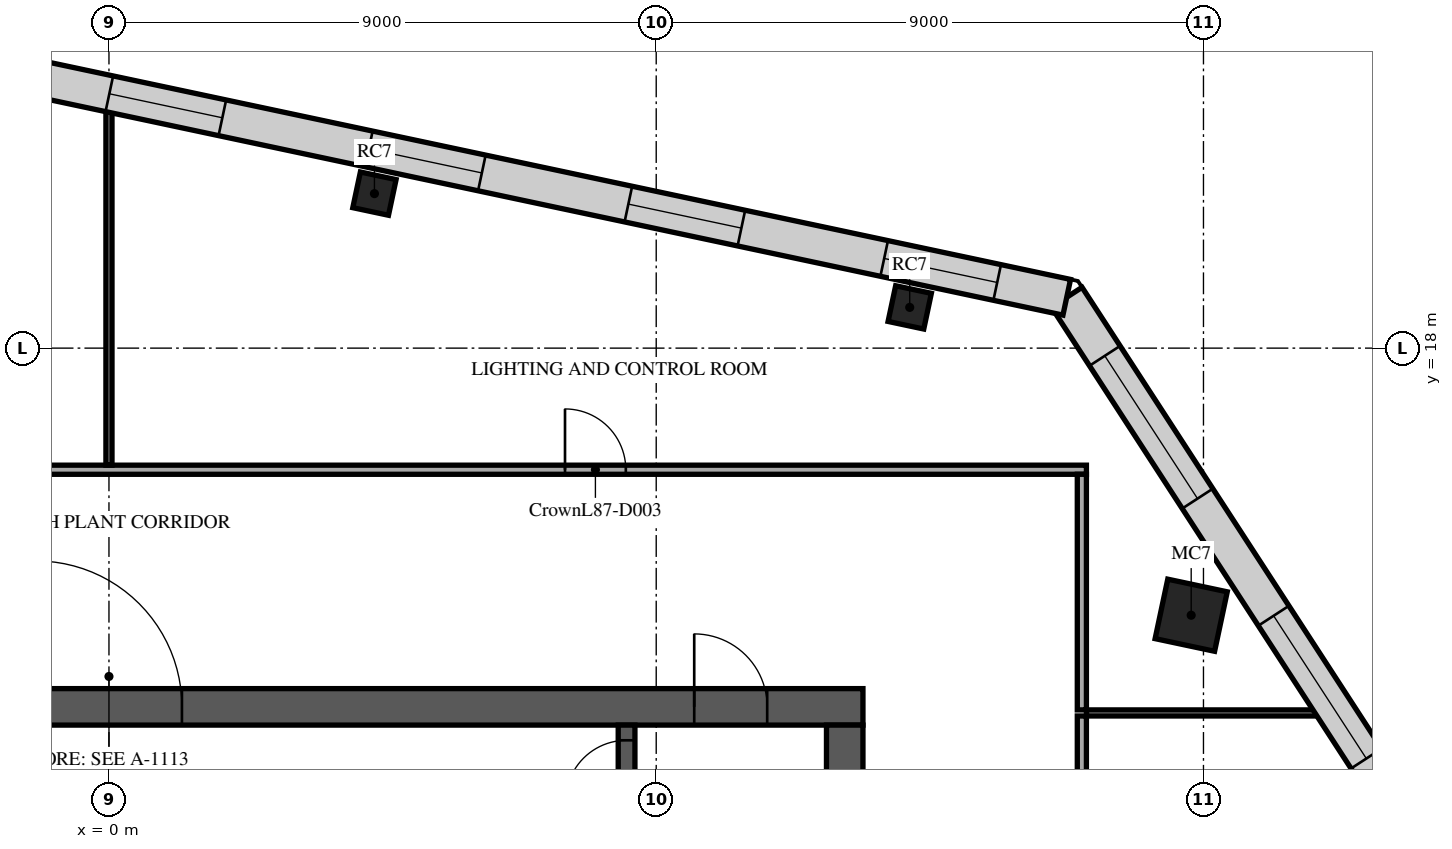
"""IFC4 building model, lengths in metres.
Left out: names, types, materials, properties, quantities, classifications, styles, units other than length and angle.
Written with IfcOpenShell. Run it as: python <this file> out.ifc"""

import sys

from ifc_helpers import new_model, si_unit, direction, frame, frame_2d, origin, origin_2d, place, context, subcontext, project, spatial, rectangle, extrude, element, fill, save


model = new_model("IFC4")
c1 = context("Model", 3, precision=1e-05, world=origin(), true_north=direction((0.0, 1.0)))
c2 = subcontext(c1, "Body", "Model", "MODEL_VIEW")
j1 = project(units=[si_unit("LENGTHUNIT", "METRE"), si_unit("PLANEANGLEUNIT", "RADIAN")], contexts=[c1])
p1 = place(None, origin())
s1 = spatial("IfcSite", under=j1, at=p1, CompositionType="ELEMENT")
p2 = place(p1, origin())
s2 = spatial("IfcBuilding", under=s1, at=p2, CompositionType="ELEMENT")
p3 = place(p2, frame((0.0, 0.0, 373.1)))
s3 = spatial("IfcBuildingStorey", under=s2, at=p3, CompositionType="ELEMENT", Elevation=373.1)
p4 = place(p3, frame((17.798, 13.607, 0.0), z_axis=(0.0, 0.0, 1.0), x_axis=(0.207911690818, 0.978147600734, 0.0)))
e1 = element("IfcColumn", 1, at=p4, inside=s3, PredefinedType="COLUMN", context=c2, shape_type="SweptSolid", body=[
    extrude(rectangle(XDim=1.0, YDim=1.0, at=origin_2d()), origin(), (0.0, 0.0, 1.0), 3.5),
])
for number, where, z_axis, x_axis in (
    (2, (13.169, 18.67, 0.0), (0.0, 0.0, 1.0), (0.208, 0.978, 0.0)),
    (3, (4.366, 20.541, 0.0), (0.0, 0.0, 1.0), (0.208, 0.978, 0.0)),
):
    element("IfcColumn", number, at=place(p3, frame(where, z_axis=z_axis, x_axis=x_axis)), inside=s3, PredefinedType="COLUMN", context=c2, shape_type="SweptSolid", body=[
        extrude(rectangle(XDim=0.6, YDim=0.6, at=origin_2d()), origin(), (0.0, 0.0, 1.0), 3.5),
    ])
p5 = place(p3, frame((-12.4, 12.1, 0.0), z_axis=(0.0, 0.0, 1.0), x_axis=(1.0, 0.0, 0.0)))
e4 = element("IfcWall", 4, at=p5, inside=s3, PredefinedType="SHEAR", context=c2, shape_type="SweptSolid", body=[
    extrude(rectangle(XDim=24.8, YDim=0.6, at=frame_2d((12.4, 0.0))), origin(), (0.0, 0.0, 1.0), 3.2),
])
p6 = place(p5, frame((11.2, 0.0, 0.0)))
e5 = element("IfcOpeningElement", 5, at=p6, cuts=e4, PredefinedType="OPENING", context=c2, shape_type="SweptSolid", body=[
    extrude(rectangle(XDim=2.4, YDim=2.4, at=frame_2d((1.2, 1.2))), frame((0.0, 0.31, 0.0), z_axis=(0.0, -1.0, 0.0), x_axis=(1.0, 0.0, 0.0)), (0.0, 0.0, 1.0), 0.62),
])
p7 = place(p5, frame((22.025, 0.0, 0.0)))
e6 = element("IfcOpeningElement", 6, at=p7, cuts=e4, PredefinedType="OPENING", context=c2, shape_type="SweptSolid", body=[
    extrude(rectangle(XDim=1.2, YDim=2.1, at=frame_2d((0.6, 1.05))), frame((0.0, 0.31, 0.0), z_axis=(0.0, -1.0, 0.0), x_axis=(1.0, 0.0, 0.0)), (0.0, 0.0, 1.0), 0.62),
])
p8 = place(p5, frame((1.0, 0.0, 0.0)))
e7 = element("IfcOpeningElement", 7, at=p8, cuts=e4, PredefinedType="OPENING", context=c2, shape_type="SweptSolid", body=[
    extrude(rectangle(XDim=1.0, YDim=2.1, at=frame_2d((0.5, 1.05))), frame((0.0, 0.31, 0.0), z_axis=(0.0, -1.0, 0.0), x_axis=(1.0, 0.0, 0.0)), (0.0, 0.0, 1.0), 0.62),
])
p9 = place(p3, frame((12.1, -11.8, 0.0), z_axis=(0.0, 0.0, 1.0), x_axis=(0.0, 1.0, 0.0)))
e8 = element("IfcWall", 8, at=p9, inside=s3, PredefinedType="SHEAR", context=c2, shape_type="SweptSolid", body=[
    extrude(rectangle(XDim=23.6, YDim=0.6, at=frame_2d((11.8, 0.0))), origin(), (0.0, 0.0, 1.0), 3.2),
])
p10 = place(p9, frame((10.6, 0.0, 0.0)))
e9 = element("IfcOpeningElement", 9, at=p10, cuts=e8, PredefinedType="OPENING", context=c2, shape_type="SweptSolid", body=[
    extrude(rectangle(XDim=2.4, YDim=2.4, at=frame_2d((1.2, 1.2))), frame((0.0, 0.31, 0.0), z_axis=(0.0, -1.0, 0.0), x_axis=(1.0, 0.0, 0.0)), (0.0, 0.0, 1.0), 0.62),
])
p11 = place(p3, frame((8.512, 4.55, 0.0), z_axis=(0.0, 0.0, 1.0), x_axis=(0.0, 1.0, 0.0)))
e10 = element("IfcWall", 10, at=p11, inside=s3, PredefinedType="SOLIDWALL", context=c2, shape_type="SweptSolid", body=[
    extrude(rectangle(XDim=7.25, YDim=0.275, at=frame_2d((3.625, 0.0))), origin(), (0.0, 0.0, 1.0), 3.2),
])
p12 = place(p11, frame((6.0, 0.0, 0.0)))
e11 = element("IfcOpeningElement", 11, at=p12, cuts=e10, PredefinedType="OPENING", context=c2, shape_type="SweptSolid", body=[
    extrude(rectangle(XDim=1.0, YDim=2.1, at=frame_2d((0.5, 1.05))), frame((0.0, 0.147, 0.0), z_axis=(0.0, -1.0, 0.0), x_axis=(1.0, 0.0, 0.0)), (0.0, 0.0, 1.0), 0.295),
])
p13 = place(p3, frame((16.075, 12.0, 0.0), z_axis=(0.0, 0.0, 1.0), x_axis=(1.0, 0.0, 0.0)))
e12 = element("IfcWall", 12, at=p13, inside=s3, PredefinedType="PARTITIONING", context=c2, shape_type="SweptSolid", body=[
    extrude(rectangle(XDim=3.997, YDim=0.1, at=frame_2d((1.999, 0.0))), origin(), (0.0, 0.0, 1.0), 3.2),
])
p14 = place(p3, frame((-15.615, 16.0, 0.0), z_axis=(0.0, 0.0, 1.0), x_axis=(1.0, 0.0, 0.0)))
e13 = element("IfcWall", 13, at=p14, inside=s3, PredefinedType="PARTITIONING", context=c2, shape_type="SweptSolid", body=[
    extrude(rectangle(XDim=31.689, YDim=0.15, at=frame_2d((15.845, 0.0))), origin(), (0.0, 0.0, 1.0), 2.63),
])
p15 = place(p14, frame((0.315, 0.0, 0.0)))
e14 = element("IfcOpeningElement", 14, at=p15, cuts=e13, PredefinedType="OPENING", context=c2, shape_type="SweptSolid", body=[
    extrude(rectangle(XDim=1.0, YDim=2.1, at=frame_2d((0.5, 1.05))), frame((0.0, 0.085, 0.0), z_axis=(0.0, -1.0, 0.0), x_axis=(1.0, 0.0, 0.0)), (0.0, 0.0, 1.0), 0.17),
])
p16 = place(p14, frame((23.115, 0.0, 0.0)))
e15 = element("IfcOpeningElement", 15, at=p16, cuts=e13, PredefinedType="OPENING", context=c2, shape_type="SweptSolid", body=[
    extrude(rectangle(XDim=1.0, YDim=2.1, at=frame_2d((0.5, 1.05))), frame((0.0, 0.085, 0.0), z_axis=(0.0, -1.0, 0.0), x_axis=(1.0, 0.0, 0.0)), (0.0, 0.0, 1.0), 0.17),
])
p17 = place(p3, frame((0.0, 16.075, 0.0), z_axis=(0.0, 0.0, 1.0), x_axis=(0.0, 1.0, 0.0)))
e16 = element("IfcWall", 16, at=p17, inside=s3, PredefinedType="PARTITIONING", context=c2, shape_type="SweptSolid", body=[
    extrude(rectangle(XDim=6.008, YDim=0.1, at=frame_2d((3.004, 0.0))), origin(), (0.0, 0.0, 1.0), 3.2),
])
p18 = place(p3, frame((16.0, -11.925, 0.0), z_axis=(0.0, 0.0, 1.0), x_axis=(0.0, 1.0, 0.0)))
e17 = element("IfcWall", 17, at=p18, inside=s3, PredefinedType="PARTITIONING", context=c2, shape_type="SweptSolid", body=[
    extrude(rectangle(XDim=23.875, YDim=0.15, at=frame_2d((11.938, 0.0))), origin(), (0.0, 0.0, 1.0), 2.63),
])
p19 = place(p18, frame((11.425, 0.0, 0.0)))
e18 = element("IfcOpeningElement", 18, at=p19, cuts=e17, PredefinedType="OPENING", context=c2, shape_type="SweptSolid", body=[
    extrude(rectangle(XDim=1.0, YDim=2.1, at=frame_2d((0.5, 1.05))), frame((0.0, 0.085, 0.0), z_axis=(0.0, -1.0, 0.0), x_axis=(1.0, 0.0, 0.0)), (0.0, 0.0, 1.0), 0.17),
])
p20 = place(p3, frame((16.0, 12.05, 0.0), z_axis=(0.0, 0.0, 1.0), x_axis=(0.0, 1.0, 0.0)))
e19 = element("IfcWall", 19, at=p20, inside=s3, PredefinedType="PARTITIONING", context=c2, shape_type="SweptSolid", body=[
    extrude(rectangle(XDim=3.875, YDim=0.15, at=frame_2d((1.938, 0.0))), origin(), (0.0, 0.0, 1.0), 2.63),
])
p21 = place(p3, frame((21.304, 10.286, 0.0), z_axis=(0.0, 0.0, 1.0), x_axis=(-0.544646568575, 0.838665675546, 0.0)))
e20 = element("IfcWall", 20, at=p21, inside=s3, PredefinedType="STANDARD", context=c2, shape_type="SweptSolid", body=[
    extrude(rectangle(XDim=10.195, YDim=0.6, at=frame_2d((5.098, 0.0))), origin(), (0.0, 0.0, 1.0), 3.2),
])
p22 = place(p21, frame((1.149, 0.0, 0.6)))
e21 = element("IfcOpeningElement", 21, at=p22, cuts=e20, PredefinedType="OPENING", context=c2, shape_type="SweptSolid", body=[
    extrude(rectangle(XDim=2.8, YDim=1.85, at=frame_2d((1.4, 0.925))), frame((0.0, 0.31, 0.0), z_axis=(0.0, -1.0, 0.0), x_axis=(1.0, 0.0, 0.0)), (0.0, 0.0, 1.0), 0.62),
])
p23 = place(p21, frame((6.246, 0.0, 0.6)))
e22 = element("IfcOpeningElement", 22, at=p23, cuts=e20, PredefinedType="OPENING", context=c2, shape_type="SweptSolid", body=[
    extrude(rectangle(XDim=2.8, YDim=1.85, at=frame_2d((1.4, 0.925))), frame((0.0, 0.31, 0.0), z_axis=(0.0, -1.0, 0.0), x_axis=(1.0, 0.0, 0.0)), (0.0, 0.0, 1.0), 0.62),
])
p24 = place(p3, frame((15.751, 18.837, 0.0), z_axis=(0.0, 0.0, 1.0), x_axis=(-0.978148118813, 0.207909253431, 0.0)))
e23 = element("IfcWall", 23, at=p24, inside=s3, PredefinedType="STANDARD", context=c2, shape_type="SweptSolid", body=[
    extrude(rectangle(XDim=21.568, YDim=0.6, at=frame_2d((10.784, 0.0))), origin(), (0.0, 0.0, 1.0), 3.2),
])
p25 = place(p24, frame((1.169, 0.0, 0.6)))
e24 = element("IfcOpeningElement", 24, at=p25, cuts=e23, PredefinedType="OPENING", context=c2, shape_type="SweptSolid", body=[
    extrude(rectangle(XDim=1.9, YDim=1.85, at=frame_2d((0.95, 0.925))), frame((0.0, 0.31, 0.0), z_axis=(0.0, -1.0, 0.0), x_axis=(1.0, 0.0, 0.0)), (0.0, 0.0, 1.0), 0.62),
])
p26 = place(p24, frame((5.471, 0.0, 0.6)))
e25 = element("IfcOpeningElement", 25, at=p26, cuts=e23, PredefinedType="OPENING", context=c2, shape_type="SweptSolid", body=[
    extrude(rectangle(XDim=1.9, YDim=1.85, at=frame_2d((0.95, 0.925))), frame((0.0, 0.31, 0.0), z_axis=(0.0, -1.0, 0.0), x_axis=(1.0, 0.0, 0.0)), (0.0, 0.0, 1.0), 0.62),
])
p27 = place(p24, frame((9.834, 0.0, 0.6)))
e26 = element("IfcOpeningElement", 26, at=p27, cuts=e23, PredefinedType="OPENING", context=c2, shape_type="SweptSolid", body=[
    extrude(rectangle(XDim=1.9, YDim=1.85, at=frame_2d((0.95, 0.925))), frame((0.0, 0.31, 0.0), z_axis=(0.0, -1.0, 0.0), x_axis=(1.0, 0.0, 0.0)), (0.0, 0.0, 1.0), 0.62),
])
p28 = place(p24, frame((14.197, 0.0, 0.6)))
e27 = element("IfcOpeningElement", 27, at=p28, cuts=e23, PredefinedType="OPENING", context=c2, shape_type="SweptSolid", body=[
    extrude(rectangle(XDim=1.9, YDim=1.85, at=frame_2d((0.95, 0.925))), frame((0.0, 0.31, 0.0), z_axis=(0.0, -1.0, 0.0), x_axis=(1.0, 0.0, 0.0)), (0.0, 0.0, 1.0), 0.62),
])
p29 = place(p24, frame((18.498, 0.0, 0.6)))
e28 = element("IfcOpeningElement", 28, at=p29, cuts=e23, PredefinedType="OPENING", context=c2, shape_type="SweptSolid", body=[
    extrude(rectangle(XDim=1.9, YDim=1.85, at=frame_2d((0.95, 0.925))), frame((0.0, 0.31, 0.0), z_axis=(0.0, -1.0, 0.0), x_axis=(1.0, 0.0, 0.0)), (0.0, 0.0, 1.0), 0.62),
])
p30 = place(p6, origin())
e29 = element("IfcDoor", 29, at=p30, inside=s3, OperationType="SINGLE_SWING_LEFT", PredefinedType="DOOR", context=c2, shape_type="SweptSolid", body=[
    extrude(rectangle(XDim=2.4, YDim=2.4, at=frame_2d((1.2, 1.2))), frame((0.0, 0.025, 0.0), z_axis=(0.0, -1.0, 0.0), x_axis=(1.0, 0.0, 0.0)), (0.0, 0.0, 1.0), 0.05),
])
fill(e5, e29)
p31 = place(p7, origin())
e30 = element("IfcDoor", 30, at=p31, inside=s3, OperationType="SINGLE_SWING_LEFT", PredefinedType="DOOR", context=c2, shape_type="SweptSolid", body=[
    extrude(rectangle(XDim=1.2, YDim=2.1, at=frame_2d((0.6, 1.05))), frame((0.0, 0.025, 0.0), z_axis=(0.0, -1.0, 0.0), x_axis=(1.0, 0.0, 0.0)), (0.0, 0.0, 1.0), 0.05),
])
fill(e6, e30)
p32 = place(p12, origin())
e31 = element("IfcDoor", 31, at=p32, inside=s3, OperationType="SINGLE_SWING_LEFT", PredefinedType="DOOR", context=c2, shape_type="SweptSolid", body=[
    extrude(rectangle(XDim=1.0, YDim=2.1, at=frame_2d((0.5, 1.05))), frame((0.0, 0.025, 0.0), z_axis=(0.0, -1.0, 0.0), x_axis=(1.0, 0.0, 0.0)), (0.0, 0.0, 1.0), 0.05),
])
fill(e11, e31)
p33 = place(p16, origin())
e32 = element("IfcDoor", 32, at=p33, inside=s3, OperationType="SINGLE_SWING_LEFT", PredefinedType="DOOR", context=c2, shape_type="SweptSolid", body=[
    extrude(rectangle(XDim=1.0, YDim=2.1, at=frame_2d((0.5, 1.05))), frame((0.0, 0.025, 0.0), z_axis=(0.0, -1.0, 0.0), x_axis=(1.0, 0.0, 0.0)), (0.0, 0.0, 1.0), 0.05),
])
fill(e15, e32)
p34 = place(p22, origin())
e33 = element("IfcWindow", 33, at=p34, inside=s3, PartitioningType="SINGLE_PANEL", PredefinedType="USERDEFINED", context=c2, shape_type="SweptSolid", body=[
    extrude(rectangle(XDim=2.8, YDim=1.85, at=frame_2d((1.4, 0.925))), frame((0.0, 0.03, 0.0), z_axis=(0.0, -1.0, 0.0), x_axis=(1.0, 0.0, 0.0)), (0.0, 0.0, 1.0), 0.06),
])
fill(e21, e33)
p35 = place(p23, origin())
e34 = element("IfcWindow", 34, at=p35, inside=s3, PartitioningType="SINGLE_PANEL", PredefinedType="USERDEFINED", context=c2, shape_type="SweptSolid", body=[
    extrude(rectangle(XDim=2.8, YDim=1.85, at=frame_2d((1.4, 0.925))), frame((0.0, 0.03, 0.0), z_axis=(0.0, -1.0, 0.0), x_axis=(1.0, 0.0, 0.0)), (0.0, 0.0, 1.0), 0.06),
])
fill(e22, e34)
p36 = place(p25, origin())
e35 = element("IfcWindow", 35, at=p36, inside=s3, PartitioningType="SINGLE_PANEL", PredefinedType="USERDEFINED", context=c2, shape_type="SweptSolid", body=[
    extrude(rectangle(XDim=1.9, YDim=1.85, at=frame_2d((0.95, 0.925))), frame((0.0, 0.03, 0.0), z_axis=(0.0, -1.0, 0.0), x_axis=(1.0, 0.0, 0.0)), (0.0, 0.0, 1.0), 0.06),
])
fill(e24, e35)
p37 = place(p26, origin())
e36 = element("IfcWindow", 36, at=p37, inside=s3, PartitioningType="SINGLE_PANEL", PredefinedType="USERDEFINED", context=c2, shape_type="SweptSolid", body=[
    extrude(rectangle(XDim=1.9, YDim=1.85, at=frame_2d((0.95, 0.925))), frame((0.0, 0.03, 0.0), z_axis=(0.0, -1.0, 0.0), x_axis=(1.0, 0.0, 0.0)), (0.0, 0.0, 1.0), 0.06),
])
fill(e25, e36)
p38 = place(p27, origin())
e37 = element("IfcWindow", 37, at=p38, inside=s3, PartitioningType="SINGLE_PANEL", PredefinedType="USERDEFINED", context=c2, shape_type="SweptSolid", body=[
    extrude(rectangle(XDim=1.9, YDim=1.85, at=frame_2d((0.95, 0.925))), frame((0.0, 0.03, 0.0), z_axis=(0.0, -1.0, 0.0), x_axis=(1.0, 0.0, 0.0)), (0.0, 0.0, 1.0), 0.06),
])
fill(e26, e37)
p39 = place(p28, origin())
e38 = element("IfcWindow", 38, at=p39, inside=s3, PartitioningType="SINGLE_PANEL", PredefinedType="USERDEFINED", context=c2, shape_type="SweptSolid", body=[
    extrude(rectangle(XDim=1.9, YDim=1.85, at=frame_2d((0.95, 0.925))), frame((0.0, 0.03, 0.0), z_axis=(0.0, -1.0, 0.0), x_axis=(1.0, 0.0, 0.0)), (0.0, 0.0, 1.0), 0.06),
])
fill(e27, e38)
save(model, sys.argv[1])
